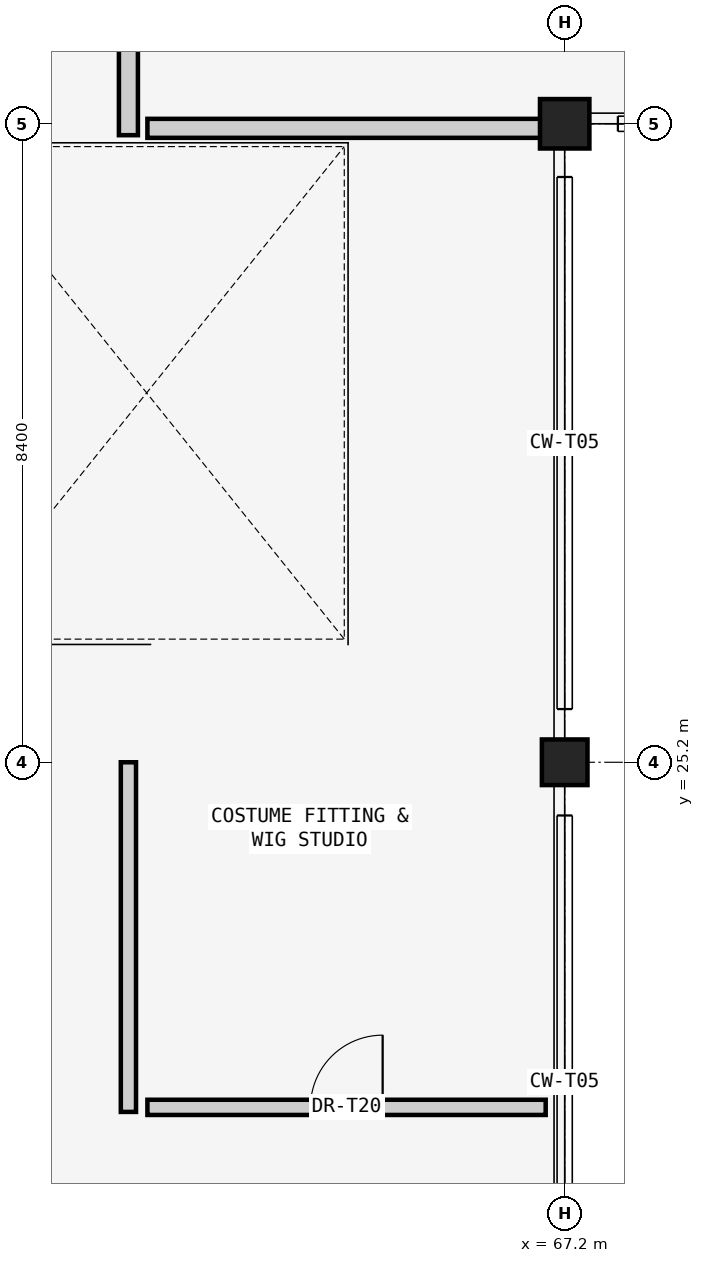
"""IFC4 building model, lengths in metres.
Left out: names, types, materials, properties, quantities, classifications, styles, units other than length and angle.
Written with IfcOpenShell. Run it as: python <this file> out.ifc"""

import sys

from ifc_helpers import new_model, si_unit, direction, frame, frame_2d, origin, origin_2d, place, context, subcontext, project, spatial, rectangle, extrude, element, fill, save


model = new_model("IFC4")
c1 = context("Model", 3, precision=1e-05, world=origin(), true_north=direction((0.0, 1.0)))
c2 = subcontext(c1, "Body", "Model", "MODEL_VIEW")
j1 = project(units=[si_unit("LENGTHUNIT", "METRE"), si_unit("PLANEANGLEUNIT", "RADIAN")], contexts=[c1])
p1 = place(None, origin())
s1 = spatial("IfcSite", under=j1, at=p1, CompositionType="ELEMENT")
p2 = place(p1, origin())
s2 = spatial("IfcBuilding", under=s1, at=p2, CompositionType="ELEMENT")
p3 = place(p2, frame((0.0, 0.0, 10.2)))
s3 = spatial("IfcBuildingStorey", under=s2, at=p3, CompositionType="ELEMENT", Elevation=10.2)
p4 = place(p3, frame((67.2, 25.2, 0.0), z_axis=(0.0, 0.0, 1.0), x_axis=(1.0, 0.0, 0.0)))
e1 = element("IfcColumn", 1, at=p4, inside=s3, PredefinedType="COLUMN", context=c2, shape_type="SweptSolid", body=[
    extrude(rectangle(XDim=0.6, YDim=0.6, at=origin_2d()), origin(), (0.0, 0.0, 1.0), 4.64),
])
p5 = place(p3, frame((67.2, 33.6, 0.0), z_axis=(0.0, 0.0, 1.0), x_axis=(1.0, 0.0, 0.0)))
e2 = element("IfcColumn", 2, at=p5, inside=s3, PredefinedType="COLUMN", context=c2, shape_type="SweptSolid", body=[
    extrude(rectangle(XDim=0.65, YDim=0.65, at=origin_2d()), origin(), (0.0, 0.0, 1.0), 4.53),
])
p6 = place(p3, frame((61.46, 33.45, 0.0), z_axis=(0.0, 0.0, 1.0), x_axis=(0.0, 1.0, 0.0)))
e3 = element("IfcWall", 3, at=p6, inside=s3, PredefinedType="SOLIDWALL", context=c2, shape_type="SweptSolid", body=[
    extrude(rectangle(XDim=18.75, YDim=0.25, at=frame_2d((9.375, 0.0))), origin(), (0.0, 0.0, 1.0), 4.48),
])
p7 = place(p6, frame((8.375, 0.0, 0.0)))
e4 = element("IfcOpeningElement", 4, at=p7, cuts=e3, PredefinedType="OPENING", context=c2, shape_type="SweptSolid", body=[
    extrude(rectangle(XDim=2.0, YDim=2.4, at=frame_2d((1.0, 1.2))), frame((0.0, 0.135, 0.0), z_axis=(0.0, -1.0, 0.0), x_axis=(1.0, 0.0, 0.0)), (0.0, 0.0, 1.0), 0.27),
])
p8 = place(p3, frame((61.46, 20.6, 0.0), z_axis=(0.0, 0.0, 1.0), x_axis=(0.0, 1.0, 0.0)))
e5 = element("IfcWall", 5, at=p8, inside=s3, PredefinedType="SOLIDWALL", context=c2, shape_type="SweptSolid", body=[
    extrude(rectangle(XDim=4.6, YDim=0.2, at=frame_2d((2.3, 0.0))), origin(), (0.0, 0.0, 1.0), 4.3),
])
p9 = place(p3, frame((61.71, 20.66, 0.0), z_axis=(0.0, 0.0, 1.0), x_axis=(1.0, 0.0, 0.0)))
e6 = element("IfcWall", 6, at=p9, inside=s3, PredefinedType="SOLIDWALL", context=c2, shape_type="SweptSolid", body=[
    extrude(rectangle(XDim=5.24, YDim=0.2, at=frame_2d((2.62, 0.0))), origin(), (0.0, 0.0, 1.0), 4.3),
])
p10 = place(p9, frame((2.145, 0.0, 0.0)))
e7 = element("IfcOpeningElement", 7, at=p10, cuts=e6, PredefinedType="OPENING", context=c2, shape_type="SweptSolid", body=[
    extrude(rectangle(XDim=0.95, YDim=2.15, at=frame_2d((0.475, 1.075))), frame((0.0, 0.11, 0.0), z_axis=(0.0, -1.0, 0.0), x_axis=(1.0, 0.0, 0.0)), (0.0, 0.0, 1.0), 0.22),
])
p11 = place(p3, frame((61.71, 33.54, 0.0), z_axis=(0.0, 0.0, 1.0), x_axis=(1.0, 0.0, 0.0)))
e8 = element("IfcWall", 8, at=p11, inside=s3, PredefinedType="SOLIDWALL", context=c2, shape_type="SweptSolid", body=[
    extrude(rectangle(XDim=5.27, YDim=0.25, at=frame_2d((2.635, 0.0))), origin(), (0.0, 0.0, 1.0), 4.178),
])
p12 = place(p10, origin())
e9 = element("IfcDoor", 9, at=p12, inside=s3, OperationType="SINGLE_SWING_RIGHT", PredefinedType="DOOR", context=c2, shape_type="SweptSolid", body=[
    extrude(rectangle(XDim=0.95, YDim=2.15, at=frame_2d((0.475, 1.075))), frame((0.0, 0.025, 0.0), z_axis=(0.0, -1.0, 0.0), x_axis=(1.0, 0.0, 0.0)), (0.0, 0.0, 1.0), 0.05),
])
fill(e7, e9)
save(model, sys.argv[1])
